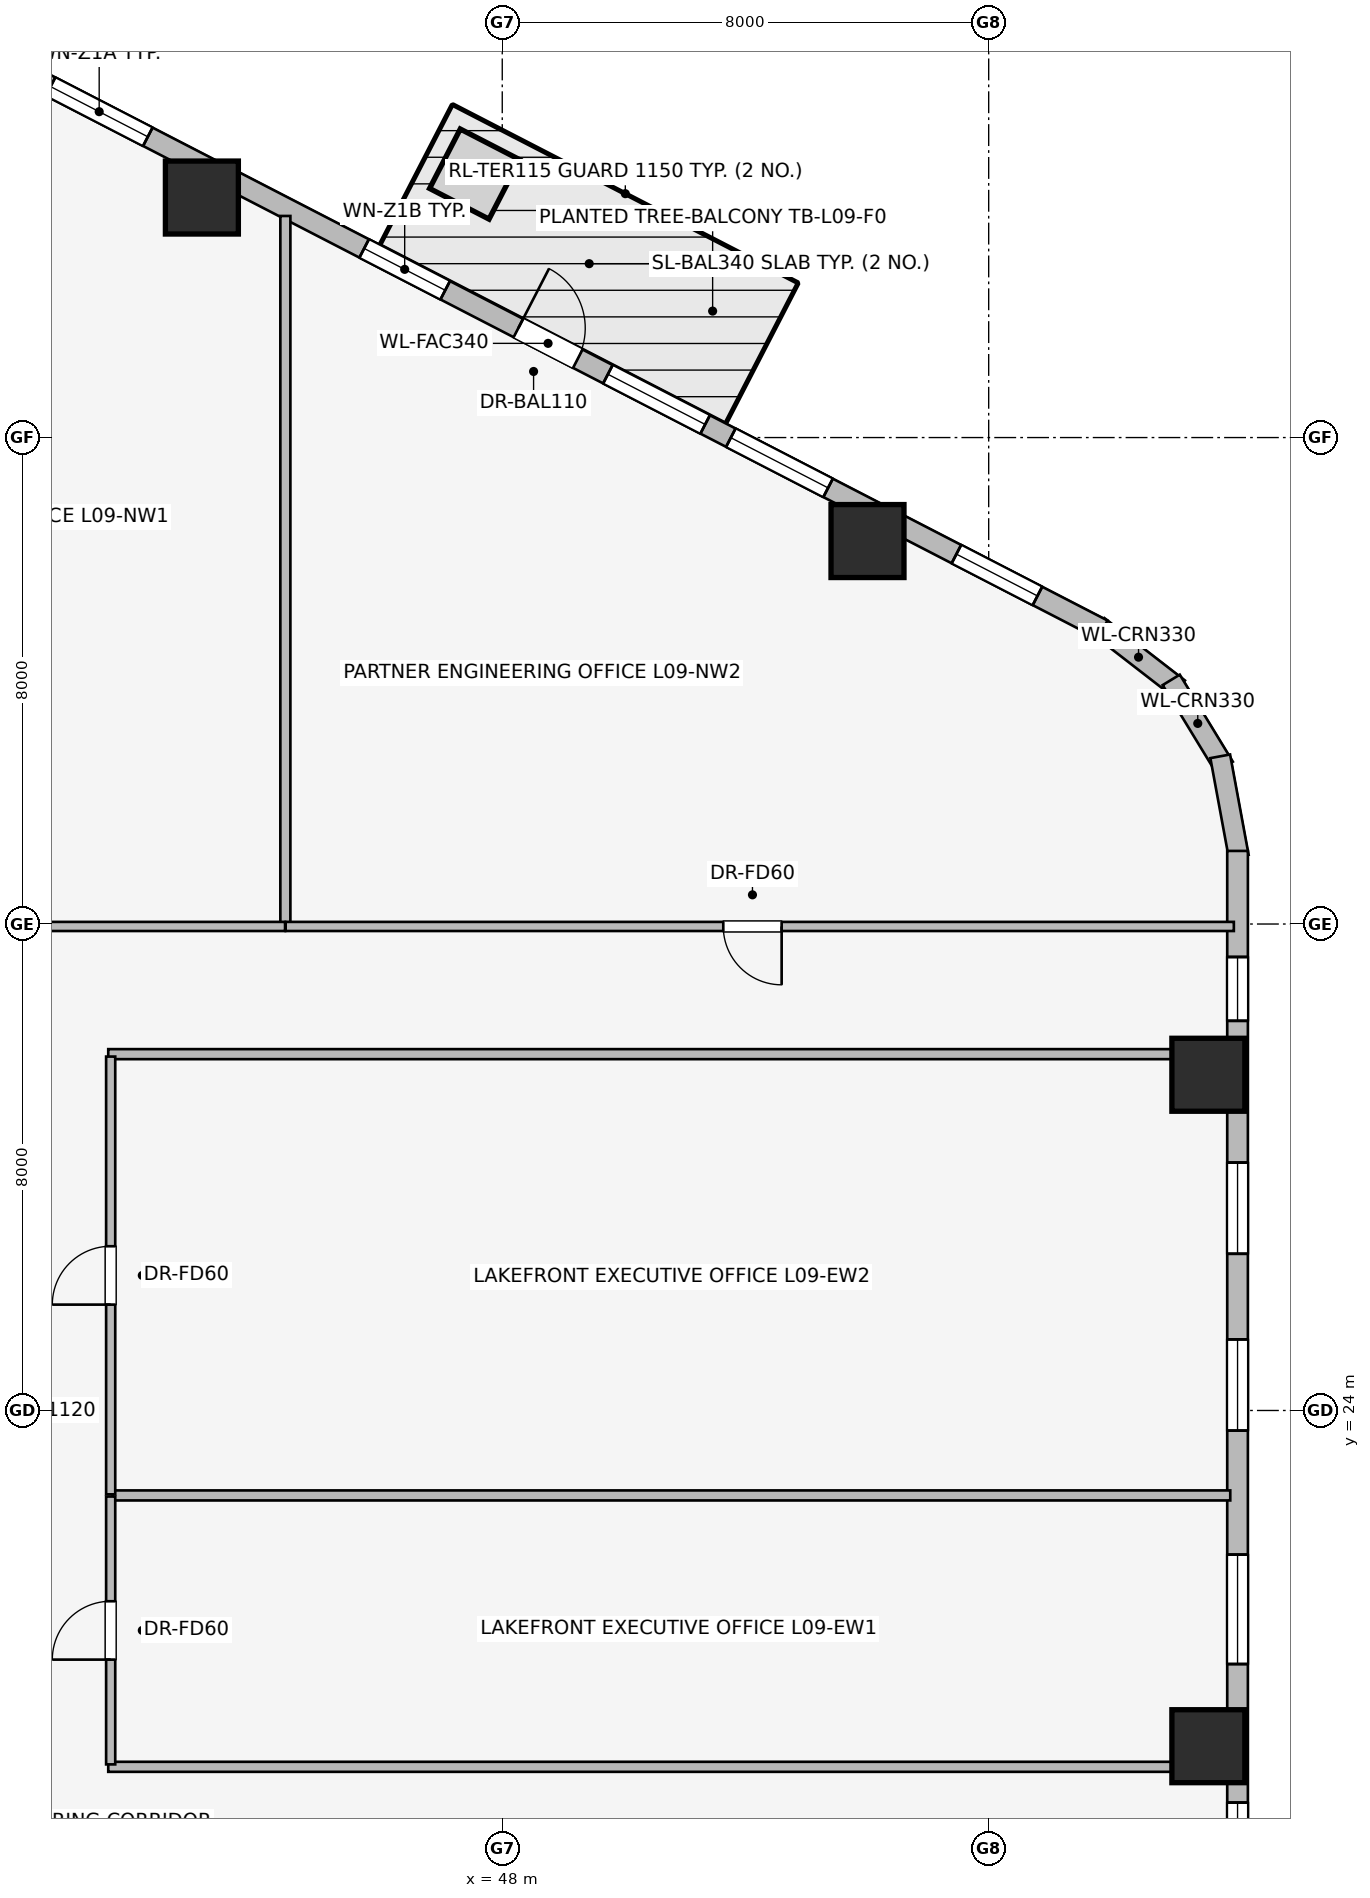
"""IFC4 building model, lengths in metres.
Left out: names, types, materials, properties, quantities, classifications, styles, units other than length and angle.
Written with IfcOpenShell. Run it as: python <this file> out.ifc"""

import sys

from ifc_helpers import new_model, si_unit, direction, frame, frame_2d, origin, origin_2d, place, context, subcontext, project, spatial, rectangle, extrude, element, fill, save


model = new_model("IFC4")
c1 = context("Model", 3, precision=1e-05, world=origin(), true_north=direction((0.0, 1.0)))
c2 = subcontext(c1, "Body", "Model", "MODEL_VIEW")
j1 = project(units=[si_unit("LENGTHUNIT", "METRE"), si_unit("PLANEANGLEUNIT", "RADIAN")], contexts=[c1])
p1 = place(None, origin())
s1 = spatial("IfcSite", under=j1, at=p1, CompositionType="ELEMENT")
p2 = place(p1, origin())
s2 = spatial("IfcBuilding", under=s1, at=p2, CompositionType="ELEMENT")
p3 = place(p2, frame((0.0, 0.0, 37.95)))
s3 = spatial("IfcBuildingStorey", under=s2, at=p3, CompositionType="ELEMENT", Elevation=37.95)
for number, where, z_axis, x_axis in (
    (1, (54.007, 38.298, 0.0), (0.0, 0.0, 1.0), (1.0, 0.0, 0.0)),
    (2, (43.06, 43.947, 0.0), (0.0, 0.0, 1.0), (1.0, 0.0, 0.0)),
    (3, (59.613, 18.479, 0.0), (0.0, 0.0, 1.0), (1.0, 0.0, 0.0)),
    (4, (59.613, 29.521, 0.0), (0.0, 0.0, 1.0), (1.0, 0.0, 0.0)),
):
    element("IfcColumn", number, at=place(p3, frame(where, z_axis=z_axis, x_axis=x_axis)), inside=s3, PredefinedType="COLUMN", context=c2, shape_type="SweptSolid", body=[
        extrude(rectangle(XDim=1.2, YDim=1.2, at=origin_2d()), origin(), (0.0, 0.0, 1.0), 3.65),
    ])
p4 = place(p3, frame((57.802, 36.901, 0.0), z_axis=(0.0, 0.0, 1.0), x_axis=(0.790691856293, -0.61221433207, 0.0)))
e5 = element("IfcWall", 5, at=p4, inside=s3, PredefinedType="STANDARD", context=c2, shape_type="SweptSolid", body=[
    extrude(rectangle(XDim=1.676, YDim=0.33, at=frame_2d((0.838, 0.0))), origin(), (0.0, 0.0, 1.0), 3.39),
])
p5 = place(p3, frame((59.002, 36.015, 0.0), z_axis=(0.0, 0.0, 1.0), x_axis=(0.520584129191, -0.853810379671, 0.0)))
e6 = element("IfcWall", 6, at=p5, inside=s3, PredefinedType="STANDARD", context=c2, shape_type="SweptSolid", body=[
    extrude(rectangle(XDim=1.677, YDim=0.33, at=frame_2d((0.838, 0.0))), origin(), (0.0, 0.0, 1.0), 3.39),
])
p6 = place(p3, frame((59.808, 34.758, 0.0), z_axis=(0.0, 0.0, 1.0), x_axis=(0.181714143354, -0.983351397063, 0.0)))
e7 = element("IfcWall", 7, at=p6, inside=s3, PredefinedType="STANDARD", context=c2, shape_type="SweptSolid", body=[
    extrude(rectangle(XDim=1.678, YDim=0.33, at=frame_2d((0.839, 0.0))), origin(), (0.0, 0.0, 1.0), 3.39),
])
p7 = place(p3, frame((39.631, 46.257, 0.0), z_axis=(0.0, 0.0, 1.0), x_axis=(0.888634413993, -0.458616264721, 0.0)))
e8 = element("IfcWall", 8, at=p7, inside=s3, PredefinedType="STANDARD", context=c2, shape_type="SweptSolid", body=[
    extrude(rectangle(XDim=20.531, YDim=0.34, at=frame_2d((10.266, 0.0))), origin(), (0.0, 0.0, 1.0), 2.684),
])
p8 = place(p7, frame((9.716, 0.0, 0.0)))
e9 = element("IfcOpeningElement", 9, at=p8, cuts=e8, PredefinedType="OPENING", context=c2, shape_type="SweptSolid", body=[
    extrude(rectangle(XDim=1.1, YDim=2.04, at=frame_2d((0.55, 1.02))), frame((0.0, 0.18, 0.0), z_axis=(0.0, -1.0, 0.0), x_axis=(1.0, 0.0, 0.0)), (0.0, 0.0, 1.0), 0.36),
])
p9 = place(p7, frame((1.058, 0.0, 0.75)))
e10 = element("IfcOpeningElement", 10, at=p9, cuts=e8, PredefinedType="OPENING", context=c2, shape_type="SweptSolid", body=[
    extrude(rectangle(XDim=1.8, YDim=1.5, at=frame_2d((0.9, 0.75))), frame((0.0, 0.18, 0.0), z_axis=(0.0, -1.0, 0.0), x_axis=(1.0, 0.0, 0.0)), (0.0, 0.0, 1.0), 0.36),
])
p10 = place(p7, frame((6.862, 0.0, 0.75)))
e11 = element("IfcOpeningElement", 11, at=p10, cuts=e8, PredefinedType="OPENING", context=c2, shape_type="SweptSolid", body=[
    extrude(rectangle(XDim=1.5, YDim=1.5, at=frame_2d((0.75, 0.75))), frame((0.0, 0.18, 0.0), z_axis=(0.0, -1.0, 0.0), x_axis=(1.0, 0.0, 0.0)), (0.0, 0.0, 1.0), 0.36),
])
p11 = place(p7, frame((11.373, 0.0, 0.75)))
e12 = element("IfcOpeningElement", 12, at=p11, cuts=e8, PredefinedType="OPENING", context=c2, shape_type="SweptSolid", body=[
    extrude(rectangle(XDim=1.8, YDim=1.5, at=frame_2d((0.9, 0.75))), frame((0.0, 0.18, 0.0), z_axis=(0.0, -1.0, 0.0), x_axis=(1.0, 0.0, 0.0)), (0.0, 0.0, 1.0), 0.36),
])
p12 = place(p7, frame((13.648, 0.0, 0.75)))
e13 = element("IfcOpeningElement", 13, at=p12, cuts=e8, PredefinedType="OPENING", context=c2, shape_type="SweptSolid", body=[
    extrude(rectangle(XDim=1.8, YDim=1.5, at=frame_2d((0.9, 0.75))), frame((0.0, 0.18, 0.0), z_axis=(0.0, -1.0, 0.0), x_axis=(1.0, 0.0, 0.0)), (0.0, 0.0, 1.0), 0.36),
])
p13 = place(p7, frame((17.823, 0.0, 0.75)))
e14 = element("IfcOpeningElement", 14, at=p13, cuts=e8, PredefinedType="OPENING", context=c2, shape_type="SweptSolid", body=[
    extrude(rectangle(XDim=1.5, YDim=1.5, at=frame_2d((0.75, 0.75))), frame((0.0, 0.18, 0.0), z_axis=(0.0, -1.0, 0.0), x_axis=(1.0, 0.0, 0.0)), (0.0, 0.0, 1.0), 0.36),
])
p14 = place(p3, frame((60.093, 33.202, 0.0), z_axis=(0.0, 0.0, 1.0), x_axis=(0.0, -1.0, 0.0)))
e15 = element("IfcWall", 15, at=p14, inside=s3, PredefinedType="STANDARD", context=c2, shape_type="SweptSolid", body=[
    extrude(rectangle(XDim=18.404, YDim=0.34, at=frame_2d((9.202, 0.0))), origin(), (0.0, 0.0, 1.0), 2.684),
])
p15 = place(p14, frame((1.744, 0.0, 0.75)))
e16 = element("IfcOpeningElement", 16, at=p15, cuts=e15, PredefinedType="OPENING", context=c2, shape_type="SweptSolid", body=[
    extrude(rectangle(XDim=1.05, YDim=1.4, at=frame_2d((0.525, 0.7))), frame((0.0, 0.18, 0.0), z_axis=(0.0, -1.0, 0.0), x_axis=(1.0, 0.0, 0.0)), (0.0, 0.0, 1.0), 0.36),
])
p16 = place(p14, frame((5.125, 0.0, 0.75)))
e17 = element("IfcOpeningElement", 17, at=p16, cuts=e15, PredefinedType="OPENING", context=c2, shape_type="SweptSolid", body=[
    extrude(rectangle(XDim=1.5, YDim=1.5, at=frame_2d((0.75, 0.75))), frame((0.0, 0.18, 0.0), z_axis=(0.0, -1.0, 0.0), x_axis=(1.0, 0.0, 0.0)), (0.0, 0.0, 1.0), 0.36),
])
p17 = place(p14, frame((8.033, 0.0, 0.75)))
e18 = element("IfcOpeningElement", 18, at=p17, cuts=e15, PredefinedType="OPENING", context=c2, shape_type="SweptSolid", body=[
    extrude(rectangle(XDim=1.5, YDim=1.5, at=frame_2d((0.75, 0.75))), frame((0.0, 0.18, 0.0), z_axis=(0.0, -1.0, 0.0), x_axis=(1.0, 0.0, 0.0)), (0.0, 0.0, 1.0), 0.36),
])
p18 = place(p14, frame((11.572, 0.0, 0.75)))
e19 = element("IfcOpeningElement", 19, at=p18, cuts=e15, PredefinedType="OPENING", context=c2, shape_type="SweptSolid", body=[
    extrude(rectangle(XDim=1.8, YDim=1.5, at=frame_2d((0.9, 0.75))), frame((0.0, 0.18, 0.0), z_axis=(0.0, -1.0, 0.0), x_axis=(1.0, 0.0, 0.0)), (0.0, 0.0, 1.0), 0.36),
])
p19 = place(p14, frame((15.65, 0.0, 0.75)))
e20 = element("IfcOpeningElement", 20, at=p19, cuts=e15, PredefinedType="OPENING", context=c2, shape_type="SweptSolid", body=[
    extrude(rectangle(XDim=1.05, YDim=1.4, at=frame_2d((0.525, 0.7))), frame((0.0, 0.18, 0.0), z_axis=(0.0, -1.0, 0.0), x_axis=(1.0, 0.0, 0.0)), (0.0, 0.0, 1.0), 0.36),
])
p20 = place(p3, frame((44.433, 31.97, 0.0), z_axis=(0.0, 0.0, 1.0), x_axis=(0.0, 1.0, 0.0)))
e21 = element("IfcWall", 21, at=p20, inside=s3, PredefinedType="PARTITIONING", context=c2, shape_type="SweptSolid", body=[
    extrude(rectangle(XDim=11.674, YDim=0.165, at=frame_2d((5.837, 0.0))), origin(), (0.0, 0.0, 1.0), 3.39),
])
p21 = place(p3, frame((44.428, 31.96, 0.0), z_axis=(0.0, 0.0, 1.0), x_axis=(-1.0, 0.0, 0.0)))
e22 = element("IfcWall", 22, at=p21, inside=s3, PredefinedType="PARTITIONING", context=c2, shape_type="SweptSolid", body=[
    extrude(rectangle(XDim=10.138, YDim=0.15, at=frame_2d((5.069, 0.0))), origin(), (0.0, 0.0, 1.0), 3.39),
])
p22 = place(p21, frame((4.47, 0.0, 0.0)))
e23 = element("IfcOpeningElement", 23, at=p22, cuts=e22, PredefinedType="OPENING", context=c2, shape_type="SweptSolid", body=[
    extrude(rectangle(XDim=0.96, YDim=2.0, at=frame_2d((0.48, 1.0))), frame((0.0, 0.085, 0.0), z_axis=(0.0, -1.0, 0.0), x_axis=(1.0, 0.0, 0.0)), (0.0, 0.0, 1.0), 0.17),
])
p23 = place(p3, frame((60.032, 31.96, 0.0), z_axis=(0.0, 0.0, 1.0), x_axis=(-1.0, 0.0, 0.0)))
e24 = element("IfcWall", 24, at=p23, inside=s3, PredefinedType="PARTITIONING", context=c2, shape_type="SweptSolid", body=[
    extrude(rectangle(XDim=15.594, YDim=0.15, at=frame_2d((7.797, 0.0))), origin(), (0.0, 0.0, 1.0), 3.39),
])
p24 = place(p23, frame((7.437, 0.0, 0.0)))
e25 = element("IfcOpeningElement", 25, at=p24, cuts=e24, PredefinedType="OPENING", context=c2, shape_type="SweptSolid", body=[
    extrude(rectangle(XDim=0.96, YDim=2.0, at=frame_2d((0.48, 1.0))), frame((0.0, 0.085, 0.0), z_axis=(0.0, -1.0, 0.0), x_axis=(1.0, 0.0, 0.0)), (0.0, 0.0, 1.0), 0.17),
])
for number, where, z_axis, x_axis in (
    (26, (41.52, 18.14, 0.0), (0.0, 0.0, 1.0), (1.0, 0.0, 0.0)),
    (27, (41.52, 29.86, 0.0), (0.0, 0.0, 1.0), (1.0, 0.0, 0.0)),
):
    element("IfcWall", number, at=place(p3, frame(where, z_axis=z_axis, x_axis=x_axis)), inside=s3, PredefinedType="PARTITIONING", context=c2, shape_type="SweptSolid", body=[
        extrude(rectangle(XDim=18.453, YDim=0.165, at=frame_2d((9.227, 0.0))), origin(), (0.0, 0.0, 1.0), 2.298),
    ])
p25 = place(p3, frame((41.59, 22.603, 0.0), z_axis=(0.0, 0.0, 1.0), x_axis=(1.0, 0.0, 0.0)))
e28 = element("IfcWall", 28, at=p25, inside=s3, PredefinedType="PARTITIONING", context=c2, shape_type="SweptSolid", body=[
    extrude(rectangle(XDim=18.383, YDim=0.165, at=frame_2d((9.191, 0.0))), origin(), (0.0, 0.0, 1.0), 3.39),
])
p26 = place(p3, frame((41.56, 18.18, 0.0), z_axis=(0.0, 0.0, 1.0), x_axis=(0.0, 1.0, 0.0)))
e29 = element("IfcWall", 29, at=p26, inside=s3, PredefinedType="PARTITIONING", context=c2, shape_type="SweptSolid", body=[
    extrude(rectangle(XDim=4.405, YDim=0.15, at=frame_2d((2.203, 0.0))), origin(), (0.0, 0.0, 1.0), 3.39),
])
p27 = place(p26, frame((1.723, 0.0, 0.0)))
e30 = element("IfcOpeningElement", 30, at=p27, cuts=e29, PredefinedType="OPENING", context=c2, shape_type="SweptSolid", body=[
    extrude(rectangle(XDim=0.96, YDim=2.0, at=frame_2d((0.48, 1.0))), frame((0.0, 0.085, 0.0), z_axis=(0.0, -1.0, 0.0), x_axis=(1.0, 0.0, 0.0)), (0.0, 0.0, 1.0), 0.17),
])
p28 = place(p3, frame((41.56, 22.621, 0.0), z_axis=(0.0, 0.0, 1.0), x_axis=(0.0, 1.0, 0.0)))
e31 = element("IfcWall", 31, at=p28, inside=s3, PredefinedType="PARTITIONING", context=c2, shape_type="SweptSolid", body=[
    extrude(rectangle(XDim=7.199, YDim=0.15, at=frame_2d((3.6, 0.0))), origin(), (0.0, 0.0, 1.0), 3.39),
])
p29 = place(p28, frame((3.12, 0.0, 0.0)))
e32 = element("IfcOpeningElement", 32, at=p29, cuts=e31, PredefinedType="OPENING", context=c2, shape_type="SweptSolid", body=[
    extrude(rectangle(XDim=0.96, YDim=2.0, at=frame_2d((0.48, 1.0))), frame((0.0, 0.085, 0.0), z_axis=(0.0, -1.0, 0.0), x_axis=(1.0, 0.0, 0.0)), (0.0, 0.0, 1.0), 0.17),
])
p30 = place(p8, origin())
e33 = element("IfcDoor", 33, at=p30, inside=s3, OperationType="SINGLE_SWING_LEFT", PredefinedType="DOOR", context=c2, shape_type="SweptSolid", body=[
    extrude(rectangle(XDim=1.1, YDim=2.04, at=frame_2d((0.55, 1.02))), frame((0.0, 0.025, 0.0), z_axis=(0.0, -1.0, 0.0), x_axis=(1.0, 0.0, 0.0)), (0.0, 0.0, 1.0), 0.05),
])
fill(e9, e33)
p31 = place(p9, origin())
e34 = element("IfcWindow", 34, at=p31, inside=s3, PartitioningType="SINGLE_PANEL", PredefinedType="WINDOW", context=c2, shape_type="SweptSolid", body=[
    extrude(rectangle(XDim=1.8, YDim=1.5, at=frame_2d((0.9, 0.75))), frame((0.0, 0.03, 0.0), z_axis=(0.0, -1.0, 0.0), x_axis=(1.0, 0.0, 0.0)), (0.0, 0.0, 1.0), 0.06),
])
fill(e10, e34)
p32 = place(p10, origin())
e35 = element("IfcWindow", 35, at=p32, inside=s3, PartitioningType="SINGLE_PANEL", PredefinedType="WINDOW", context=c2, shape_type="SweptSolid", body=[
    extrude(rectangle(XDim=1.5, YDim=1.5, at=frame_2d((0.75, 0.75))), frame((0.0, 0.03, 0.0), z_axis=(0.0, -1.0, 0.0), x_axis=(1.0, 0.0, 0.0)), (0.0, 0.0, 1.0), 0.06),
])
fill(e11, e35)
p33 = place(p11, origin())
e36 = element("IfcWindow", 36, at=p33, inside=s3, PartitioningType="SINGLE_PANEL", PredefinedType="WINDOW", context=c2, shape_type="SweptSolid", body=[
    extrude(rectangle(XDim=1.8, YDim=1.5, at=frame_2d((0.9, 0.75))), frame((0.0, 0.03, 0.0), z_axis=(0.0, -1.0, 0.0), x_axis=(1.0, 0.0, 0.0)), (0.0, 0.0, 1.0), 0.06),
])
fill(e12, e36)
p34 = place(p12, origin())
e37 = element("IfcWindow", 37, at=p34, inside=s3, PartitioningType="SINGLE_PANEL", PredefinedType="WINDOW", context=c2, shape_type="SweptSolid", body=[
    extrude(rectangle(XDim=1.8, YDim=1.5, at=frame_2d((0.9, 0.75))), frame((0.0, 0.03, 0.0), z_axis=(0.0, -1.0, 0.0), x_axis=(1.0, 0.0, 0.0)), (0.0, 0.0, 1.0), 0.06),
])
fill(e13, e37)
p35 = place(p13, origin())
e38 = element("IfcWindow", 38, at=p35, inside=s3, PartitioningType="SINGLE_PANEL", PredefinedType="WINDOW", context=c2, shape_type="SweptSolid", body=[
    extrude(rectangle(XDim=1.5, YDim=1.5, at=frame_2d((0.75, 0.75))), frame((0.0, 0.03, 0.0), z_axis=(0.0, -1.0, 0.0), x_axis=(1.0, 0.0, 0.0)), (0.0, 0.0, 1.0), 0.06),
])
fill(e14, e38)
p36 = place(p15, origin())
e39 = element("IfcWindow", 39, at=p36, inside=s3, PartitioningType="SINGLE_PANEL", PredefinedType="WINDOW", context=c2, shape_type="SweptSolid", body=[
    extrude(rectangle(XDim=1.05, YDim=1.4, at=frame_2d((0.525, 0.7))), frame((0.0, 0.03, 0.0), z_axis=(0.0, -1.0, 0.0), x_axis=(1.0, 0.0, 0.0)), (0.0, 0.0, 1.0), 0.06),
])
fill(e16, e39)
p37 = place(p16, origin())
e40 = element("IfcWindow", 40, at=p37, inside=s3, PartitioningType="SINGLE_PANEL", PredefinedType="WINDOW", context=c2, shape_type="SweptSolid", body=[
    extrude(rectangle(XDim=1.5, YDim=1.5, at=frame_2d((0.75, 0.75))), frame((0.0, 0.03, 0.0), z_axis=(0.0, -1.0, 0.0), x_axis=(1.0, 0.0, 0.0)), (0.0, 0.0, 1.0), 0.06),
])
fill(e17, e40)
p38 = place(p17, origin())
e41 = element("IfcWindow", 41, at=p38, inside=s3, PartitioningType="SINGLE_PANEL", PredefinedType="WINDOW", context=c2, shape_type="SweptSolid", body=[
    extrude(rectangle(XDim=1.5, YDim=1.5, at=frame_2d((0.75, 0.75))), frame((0.0, 0.03, 0.0), z_axis=(0.0, -1.0, 0.0), x_axis=(1.0, 0.0, 0.0)), (0.0, 0.0, 1.0), 0.06),
])
fill(e18, e41)
p39 = place(p18, origin())
e42 = element("IfcWindow", 42, at=p39, inside=s3, PartitioningType="SINGLE_PANEL", PredefinedType="WINDOW", context=c2, shape_type="SweptSolid", body=[
    extrude(rectangle(XDim=1.8, YDim=1.5, at=frame_2d((0.9, 0.75))), frame((0.0, 0.03, 0.0), z_axis=(0.0, -1.0, 0.0), x_axis=(1.0, 0.0, 0.0)), (0.0, 0.0, 1.0), 0.06),
])
fill(e19, e42)
p40 = place(p19, origin())
e43 = element("IfcWindow", 43, at=p40, inside=s3, PartitioningType="SINGLE_PANEL", PredefinedType="WINDOW", context=c2, shape_type="SweptSolid", body=[
    extrude(rectangle(XDim=1.05, YDim=1.4, at=frame_2d((0.525, 0.7))), frame((0.0, 0.03, 0.0), z_axis=(0.0, -1.0, 0.0), x_axis=(1.0, 0.0, 0.0)), (0.0, 0.0, 1.0), 0.06),
])
fill(e20, e43)
p41 = place(p24, origin())
e44 = element("IfcDoor", 44, at=p41, inside=s3, OperationType="SINGLE_SWING_LEFT", PredefinedType="DOOR", context=c2, shape_type="SweptSolid", body=[
    extrude(rectangle(XDim=0.96, YDim=2.0, at=frame_2d((0.48, 1.0))), frame((0.0, 0.025, 0.0), z_axis=(0.0, -1.0, 0.0), x_axis=(1.0, 0.0, 0.0)), (0.0, 0.0, 1.0), 0.05),
])
fill(e25, e44)
p42 = place(p27, origin())
e45 = element("IfcDoor", 45, at=p42, inside=s3, OperationType="SINGLE_SWING_LEFT", PredefinedType="DOOR", context=c2, shape_type="SweptSolid", body=[
    extrude(rectangle(XDim=0.96, YDim=2.0, at=frame_2d((0.48, 1.0))), frame((0.0, 0.025, 0.0), z_axis=(0.0, -1.0, 0.0), x_axis=(1.0, 0.0, 0.0)), (0.0, 0.0, 1.0), 0.05),
])
fill(e30, e45)
p43 = place(p29, origin())
e46 = element("IfcDoor", 46, at=p43, inside=s3, OperationType="SINGLE_SWING_LEFT", PredefinedType="DOOR", context=c2, shape_type="SweptSolid", body=[
    extrude(rectangle(XDim=0.96, YDim=2.0, at=frame_2d((0.48, 1.0))), frame((0.0, 0.025, 0.0), z_axis=(0.0, -1.0, 0.0), x_axis=(1.0, 0.0, 0.0)), (0.0, 0.0, 1.0), 0.05),
])
fill(e32, e46)
save(model, sys.argv[1])
